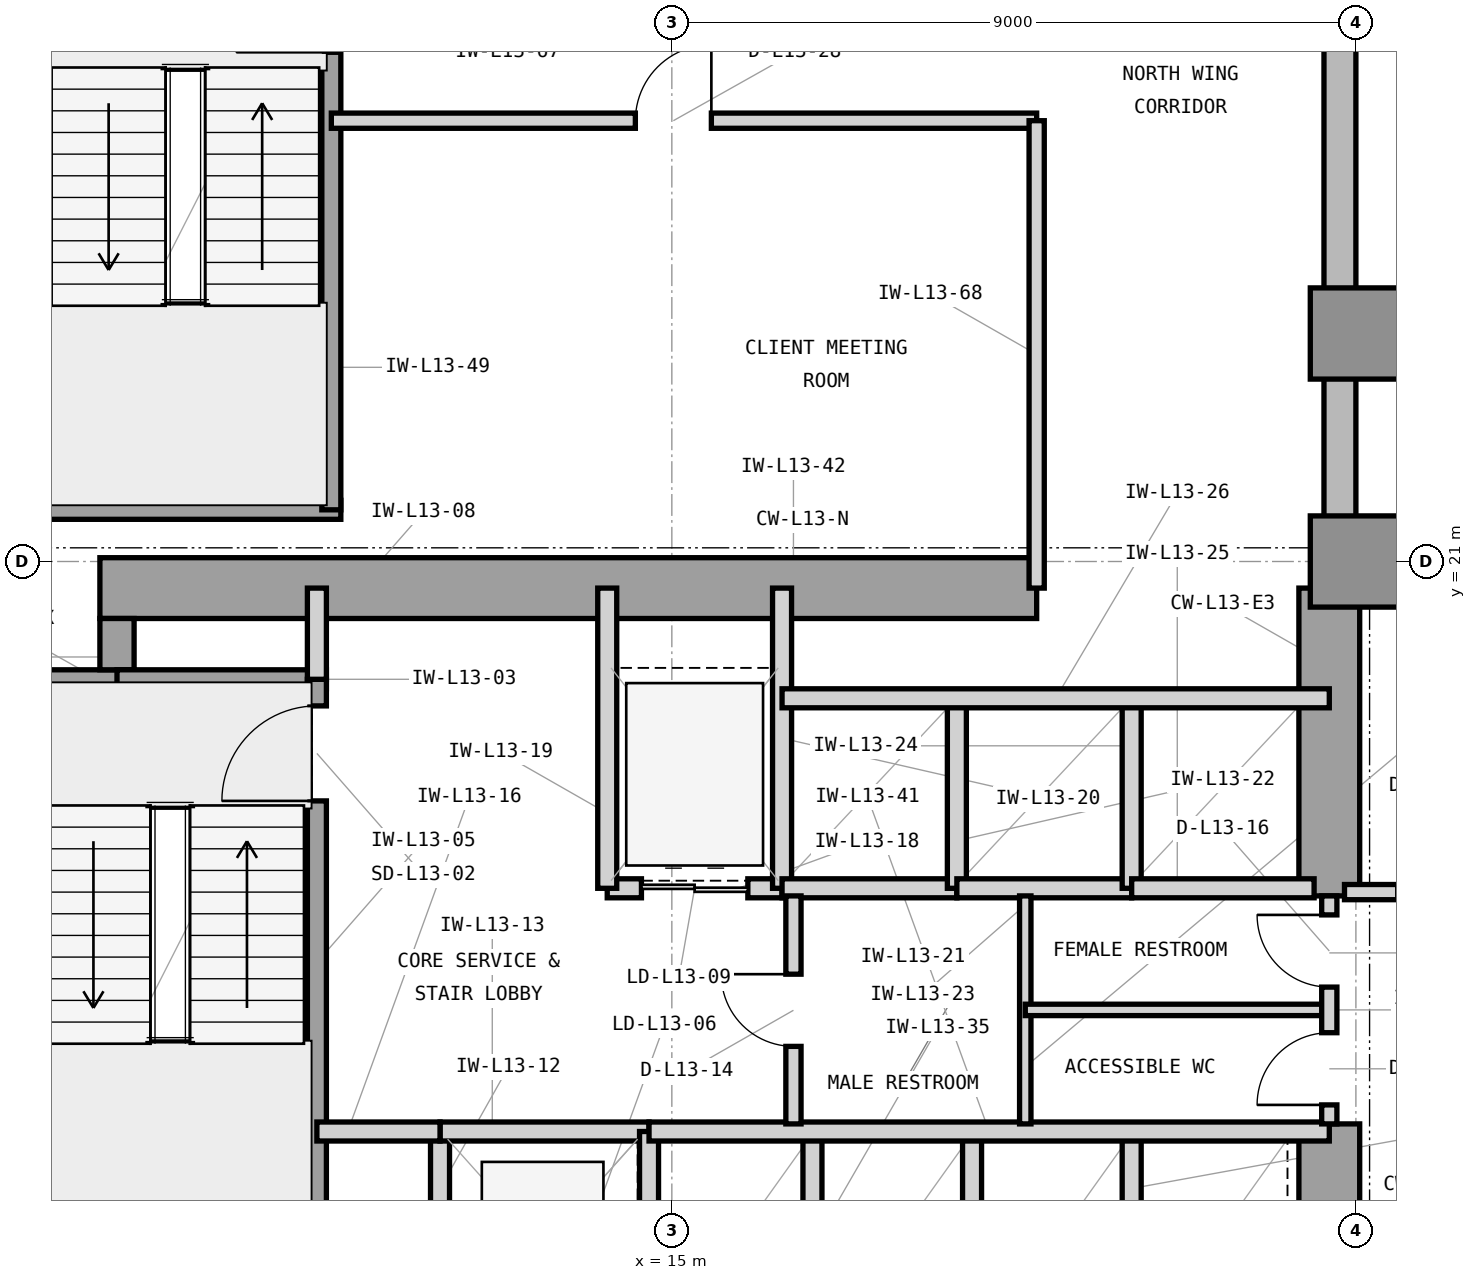
"""IFC4 building model, lengths in metres.
Left out: names, types, materials, properties, quantities, classifications, styles, units other than length and angle.
Written with IfcOpenShell. Run it as: python <this file> out.ifc"""

import sys

from ifc_helpers import new_model, si_unit, direction, frame, frame_2d, origin, origin_2d, place, context, subcontext, project, spatial, rectangle, extrude, element, fill, save


model = new_model("IFC4")
c1 = context("Model", 3, precision=1e-05, world=origin(), true_north=direction((0.0, 1.0)))
c2 = subcontext(c1, "Body", "Model", "MODEL_VIEW")
j1 = project(units=[si_unit("LENGTHUNIT", "METRE"), si_unit("PLANEANGLEUNIT", "RADIAN")], contexts=[c1])
p1 = place(None, origin())
s1 = spatial("IfcSite", under=j1, at=p1, CompositionType="ELEMENT")
p2 = place(p1, origin())
s2 = spatial("IfcBuilding", under=s1, at=p2, CompositionType="ELEMENT")
p3 = place(p2, frame((0.0, 0.0, 59.4)))
s3 = spatial("IfcBuildingStorey", under=s2, at=p3, CompositionType="ELEMENT", Elevation=59.4)
p4 = place(p3, frame((7.475, 20.65, 0.0), z_axis=(0.0, 0.0, 1.0), x_axis=(1.0, 0.0, 0.0)))
e1 = element("IfcWall", 1, at=p4, inside=s3, PredefinedType="SHEAR", context=c2, shape_type="SweptSolid", body=[
    extrude(rectangle(XDim=12.325, YDim=0.8, at=frame_2d((6.163, 0.0))), origin(), (0.0, 0.0, 1.0), 4.2),
])
p5 = place(p3, frame((23.65, 10.4, 0.0), z_axis=(0.0, 0.0, 1.0), x_axis=(0.0, 1.0, 0.0)))
e2 = element("IfcWall", 2, at=p5, inside=s3, PredefinedType="SHEAR", context=c2, shape_type="SweptSolid", body=[
    extrude(rectangle(XDim=3.2, YDim=0.8, at=frame_2d((1.6, 0.0))), origin(), (0.0, 0.0, 1.0), 4.2),
])
p6 = place(p3, frame((23.65, 16.6, 0.0), z_axis=(0.0, 0.0, 1.0), x_axis=(0.0, 1.0, 0.0)))
e3 = element("IfcWall", 3, at=p6, inside=s3, PredefinedType="SHEAR", context=c2, shape_type="SweptSolid", body=[
    extrude(rectangle(XDim=4.05, YDim=0.8, at=frame_2d((2.025, 0.0))), origin(), (0.0, 0.0, 1.0), 4.2),
])
p7 = place(p3, frame((6.75, 19.35, 0.0), z_axis=(0.0, 0.0, 1.0), x_axis=(1.0, 0.0, 0.0)))
e4 = element("IfcWall", 4, at=p7, inside=s3, PredefinedType="SHEAR", context=c2, shape_type="SweptSolid", body=[
    extrude(rectangle(XDim=1.175, YDim=0.45, at=frame_2d((0.587, 0.0))), origin(), (0.0, 0.0, 1.0), 4.2),
])
p8 = place(p3, frame((7.7, 19.575, 0.0), z_axis=(0.0, 0.0, 1.0), x_axis=(0.0, 1.0, 0.0)))
e5 = element("IfcWall", 5, at=p8, inside=s3, PredefinedType="SHEAR", context=c2, shape_type="SweptSolid", body=[
    extrude(rectangle(XDim=0.675, YDim=0.45, at=frame_2d((0.337, 0.0))), origin(), (0.0, 0.0, 1.0), 4.2),
])
for number, where, z_axis, x_axis in (
    (6, (24.0, 21.0, 0.0), (0.0, 0.0, 1.0), (1.0, 0.0, 0.0)),
    (7, (24.0, 24.0, 0.0), (0.0, 0.0, 1.0), (1.0, 0.0, 0.0)),
):
    element("IfcColumn", number, at=place(p3, frame(where, z_axis=z_axis, x_axis=x_axis)), inside=s3, PredefinedType="COLUMN", context=c2, shape_type="SweptSolid", body=[
        extrude(rectangle(XDim=1.2, YDim=1.2, at=origin_2d()), origin(), (0.0, 0.0, 1.0), 4.2),
    ])
p9 = place(p3, frame((64.4, 20.79, 0.0), z_axis=(0.0, 0.0, 1.0), x_axis=(-1.0, 0.0, 0.0)))
e8 = element("IfcWall", 8, at=p9, inside=s3, PredefinedType="STANDARD", context=c2, shape_type="SweptSolid", body=[
    extrude(rectangle(XDim=40.4, YDim=0.42, at=frame_2d((20.2, 0.0))), origin(), (0.0, 0.0, 1.0), 3.98),
])
p10 = place(p9, frame((26.375, 0.0, 0.85)))
e9 = element("IfcOpeningElement", 9, at=p10, cuts=e8, PredefinedType="OPENING", context=c2, shape_type="SweptSolid", body=[
    extrude(rectangle(XDim=2.8, YDim=2.45, at=frame_2d((1.4, 1.225))), frame((0.0, 0.22, 0.0), z_axis=(0.0, -1.0, 0.0), x_axis=(1.0, 0.0, 0.0)), (0.0, 0.0, 1.0), 0.44),
])
p11 = place(p9, frame((38.222, 0.0, 0.85)))
e10 = element("IfcOpeningElement", 10, at=p11, cuts=e8, PredefinedType="OPENING", context=c2, shape_type="SweptSolid", body=[
    extrude(rectangle(XDim=1.2, YDim=2.45, at=frame_2d((0.6, 1.225))), frame((0.0, 0.22, 0.0), z_axis=(0.0, -1.0, 0.0), x_axis=(1.0, 0.0, 0.0)), (0.0, 0.0, 1.0), 0.44),
])
p12 = place(p9, frame((33.286, 0.0, 0.85)))
e11 = element("IfcOpeningElement", 11, at=p12, cuts=e8, PredefinedType="OPENING", context=c2, shape_type="SweptSolid", body=[
    extrude(rectangle(XDim=2.8, YDim=2.45, at=frame_2d((1.4, 1.225))), frame((0.0, 0.22, 0.0), z_axis=(0.0, -1.0, 0.0), x_axis=(1.0, 0.0, 0.0)), (0.0, 0.0, 1.0), 0.44),
])
p13 = place(p9, frame((18.636, 0.0, 0.85)))
e12 = element("IfcOpeningElement", 12, at=p13, cuts=e8, PredefinedType="OPENING", context=c2, shape_type="SweptSolid", body=[
    extrude(rectangle(XDim=2.8, YDim=2.45, at=frame_2d((1.4, 1.225))), frame((0.0, 0.22, 0.0), z_axis=(0.0, -1.0, 0.0), x_axis=(1.0, 0.0, 0.0)), (0.0, 0.0, 1.0), 0.44),
])
p14 = place(p9, frame((11.436, 0.0, 0.85)))
e13 = element("IfcOpeningElement", 13, at=p14, cuts=e8, PredefinedType="OPENING", context=c2, shape_type="SweptSolid", body=[
    extrude(rectangle(XDim=1.2, YDim=2.45, at=frame_2d((0.6, 1.225))), frame((0.0, 0.22, 0.0), z_axis=(0.0, -1.0, 0.0), x_axis=(1.0, 0.0, 0.0)), (0.0, 0.0, 1.0), 0.44),
])
p15 = place(p3, frame((23.79, 21.0, 0.0), z_axis=(0.0, 0.0, 1.0), x_axis=(0.0, 1.0, 0.0)))
e14 = element("IfcWall", 14, at=p15, inside=s3, PredefinedType="STANDARD", context=c2, shape_type="SweptSolid", body=[
    extrude(rectangle(XDim=28.4, YDim=0.42, at=frame_2d((14.2, 0.0))), origin(), (0.0, 0.0, 1.0), 3.98),
])
p16 = place(p15, frame((10.433, 0.0, 0.85)))
e15 = element("IfcOpeningElement", 15, at=p16, cuts=e14, PredefinedType="OPENING", context=c2, shape_type="SweptSolid", body=[
    extrude(rectangle(XDim=2.8, YDim=2.45, at=frame_2d((1.4, 1.225))), frame((0.0, 0.22, 0.0), z_axis=(0.0, -1.0, 0.0), x_axis=(1.0, 0.0, 0.0)), (0.0, 0.0, 1.0), 0.44),
])
p17 = place(p3, frame((7.7, 19.45, 0.0), z_axis=(0.0, 0.0, 1.0), x_axis=(1.0, 0.0, 0.0)))
e16 = element("IfcWall", 16, at=p17, inside=s3, PredefinedType="SHEAR", context=c2, shape_type="SweptSolid", body=[
    extrude(rectangle(XDim=2.755, YDim=0.25, at=frame_2d((1.377, 0.0))), origin(), (0.0, 0.0, 1.0), 4.2),
])
p18 = place(p3, frame((10.33, 12.0, 0.0), z_axis=(0.0, 0.0, 1.0), x_axis=(0.0, 1.0, 0.0)))
e17 = element("IfcWall", 17, at=p18, inside=s3, PredefinedType="SHEAR", context=c2, shape_type="SweptSolid", body=[
    extrude(rectangle(XDim=7.45, YDim=0.25, at=frame_2d((3.725, 0.0))), origin(), (0.0, 0.0, 1.0), 4.2),
])
p19 = place(p18, frame((5.85, 0.0, 0.0)))
e18 = element("IfcOpeningElement", 18, at=p19, cuts=e17, PredefinedType="OPENING", context=c2, shape_type="SweptSolid", body=[
    extrude(rectangle(XDim=1.25, YDim=2.2, at=frame_2d((0.625, 1.1))), frame((0.0, 0.135, 0.0), z_axis=(0.0, -1.0, 0.0), x_axis=(1.0, 0.0, 0.0)), (0.0, 0.0, 1.0), 0.27),
])
p20 = place(p3, frame((10.33, 19.45, 0.0), z_axis=(0.0, 0.0, 1.0), x_axis=(0.0, 1.0, 0.0)))
e19 = element("IfcWall", 19, at=p20, inside=s3, PredefinedType="PARTITIONING", context=c2, shape_type="SweptSolid", body=[
    extrude(rectangle(XDim=1.2, YDim=0.25, at=frame_2d((0.6, 0.0))), origin(), (0.0, 0.0, 1.0), 3.114),
])
p21 = place(p3, frame((11.95, 10.5, 0.0), z_axis=(0.0, 0.0, 1.0), x_axis=(0.0, 1.0, 0.0)))
e20 = element("IfcWall", 20, at=p21, inside=s3, PredefinedType="PARTITIONING", context=c2, shape_type="SweptSolid", body=[
    extrude(rectangle(XDim=3.0, YDim=0.25, at=frame_2d((1.5, 0.0))), origin(), (0.0, 0.0, 1.0), 3.97),
])
p22 = place(p3, frame((11.95, 13.5, 0.0), z_axis=(0.0, 0.0, 1.0), x_axis=(1.0, 0.0, 0.0)))
e21 = element("IfcWall", 21, at=p22, inside=s3, PredefinedType="PARTITIONING", context=c2, shape_type="SweptSolid", body=[
    extrude(rectangle(XDim=2.75, YDim=0.25, at=frame_2d((1.375, 0.0))), origin(), (0.0, 0.0, 1.0), 3.426),
])
p23 = place(p3, frame((14.7, 10.5, 0.0), z_axis=(0.0, 0.0, 1.0), x_axis=(0.0, 1.0, 0.0)))
e22 = element("IfcWall", 22, at=p23, inside=s3, PredefinedType="PARTITIONING", context=c2, shape_type="SweptSolid", body=[
    extrude(rectangle(XDim=3.0, YDim=0.25, at=frame_2d((1.5, 0.0))), origin(), (0.0, 0.0, 1.0), 3.97),
])
p24 = place(p3, frame((10.33, 13.5, 0.0), z_axis=(0.0, 0.0, 1.0), x_axis=(1.0, 0.0, 0.0)))
e23 = element("IfcWall", 23, at=p24, inside=s3, PredefinedType="PARTITIONING", context=c2, shape_type="SweptSolid", body=[
    extrude(rectangle(XDim=1.62, YDim=0.25, at=frame_2d((0.81, 0.0))), origin(), (0.0, 0.0, 1.0), 3.426),
])
p25 = place(p3, frame((14.15, 16.7, 0.0), z_axis=(0.0, 0.0, 1.0), x_axis=(1.0, 0.0, 0.0)))
e24 = element("IfcWall", 24, at=p25, inside=s3, PredefinedType="PARTITIONING", context=c2, shape_type="SweptSolid", body=[
    extrude(rectangle(XDim=2.3, YDim=0.25, at=frame_2d((1.15, 0.0))), origin(), (0.0, 0.0, 1.0), 3.426),
])
p26 = place(p25, frame((0.45, 0.0, 0.0)))
e25 = element("IfcOpeningElement", 25, at=p26, cuts=e24, PredefinedType="OPENING", context=c2, shape_type="SweptSolid", body=[
    extrude(rectangle(XDim=1.4, YDim=2.35, at=frame_2d((0.7, 1.175))), frame((0.0, 0.135, 0.0), z_axis=(0.0, -1.0, 0.0), x_axis=(1.0, 0.0, 0.0)), (0.0, 0.0, 1.0), 0.27),
])
for number, where, z_axis, x_axis in (
    (26, (14.15, 16.7, 0.0), (0.0, 0.0, 1.0), (0.0, 1.0, 0.0)),
    (27, (16.45, 16.7, 0.0), (0.0, 0.0, 1.0), (0.0, 1.0, 0.0)),
):
    element("IfcWall", number, at=place(p3, frame(where, z_axis=z_axis, x_axis=x_axis)), inside=s3, PredefinedType="PARTITIONING", context=c2, shape_type="SweptSolid", body=[
        extrude(rectangle(XDim=3.95, YDim=0.25, at=frame_2d((1.975, 0.0))), origin(), (0.0, 0.0, 1.0), 3.97),
    ])
p27 = place(p3, frame((16.45, 16.7, 0.0), z_axis=(0.0, 0.0, 1.0), x_axis=(1.0, 0.0, 0.0)))
e28 = element("IfcWall", 28, at=p27, inside=s3, PredefinedType="PARTITIONING", context=c2, shape_type="SweptSolid", body=[
    extrude(rectangle(XDim=2.3, YDim=0.25, at=frame_2d((1.15, 0.0))), origin(), (0.0, 0.0, 1.0), 3.426),
])
p28 = place(p3, frame((18.75, 16.7, 0.0), z_axis=(0.0, 0.0, 1.0), x_axis=(0.0, 1.0, 0.0)))
e29 = element("IfcWall", 29, at=p28, inside=s3, PredefinedType="PARTITIONING", context=c2, shape_type="SweptSolid", body=[
    extrude(rectangle(XDim=2.5, YDim=0.25, at=frame_2d((1.25, 0.0))), origin(), (0.0, 0.0, 1.0), 3.97),
])
p29 = place(p3, frame((18.75, 16.7, 0.0), z_axis=(0.0, 0.0, 1.0), x_axis=(1.0, 0.0, 0.0)))
e30 = element("IfcWall", 30, at=p29, inside=s3, PredefinedType="PARTITIONING", context=c2, shape_type="SweptSolid", body=[
    extrude(rectangle(XDim=2.3, YDim=0.25, at=frame_2d((1.15, 0.0))), origin(), (0.0, 0.0, 1.0), 3.426),
])
p30 = place(p3, frame((21.05, 16.7, 0.0), z_axis=(0.0, 0.0, 1.0), x_axis=(0.0, 1.0, 0.0)))
e31 = element("IfcWall", 31, at=p30, inside=s3, PredefinedType="PARTITIONING", context=c2, shape_type="SweptSolid", body=[
    extrude(rectangle(XDim=2.5, YDim=0.25, at=frame_2d((1.25, 0.0))), origin(), (0.0, 0.0, 1.0), 3.97),
])
p31 = place(p3, frame((21.05, 16.7, 0.0), z_axis=(0.0, 0.0, 1.0), x_axis=(1.0, 0.0, 0.0)))
e32 = element("IfcWall", 32, at=p31, inside=s3, PredefinedType="PARTITIONING", context=c2, shape_type="SweptSolid", body=[
    extrude(rectangle(XDim=2.4, YDim=0.25, at=frame_2d((1.2, 0.0))), origin(), (0.0, 0.0, 1.0), 3.426),
])
p32 = place(p3, frame((16.45, 19.2, 0.0), z_axis=(0.0, 0.0, 1.0), x_axis=(1.0, 0.0, 0.0)))
e33 = element("IfcWall", 33, at=p32, inside=s3, PredefinedType="PARTITIONING", context=c2, shape_type="SweptSolid", body=[
    extrude(rectangle(XDim=7.2, YDim=0.25, at=frame_2d((3.6, 0.0))), origin(), (0.0, 0.0, 1.0), 3.97),
])
for number, where, z_axis, x_axis in (
    (34, (16.85, 10.5, 0.0), (0.0, 0.0, 1.0), (0.0, 1.0, 0.0)),
    (35, (18.95, 10.5, 0.0), (0.0, 0.0, 1.0), (0.0, 1.0, 0.0)),
    (36, (21.05, 10.5, 0.0), (0.0, 0.0, 1.0), (0.0, 1.0, 0.0)),
):
    element("IfcWall", number, at=place(p3, frame(where, z_axis=z_axis, x_axis=x_axis)), inside=s3, PredefinedType="PARTITIONING", context=c2, shape_type="SweptSolid", body=[
        extrude(rectangle(XDim=3.0, YDim=0.25, at=frame_2d((1.5, 0.0))), origin(), (0.0, 0.0, 1.0), 3.97),
    ])
p33 = place(p3, frame((14.7, 13.5, 0.0), z_axis=(0.0, 0.0, 1.0), x_axis=(1.0, 0.0, 0.0)))
e37 = element("IfcWall", 37, at=p33, inside=s3, PredefinedType="PARTITIONING", context=c2, shape_type="SweptSolid", body=[
    extrude(rectangle(XDim=8.95, YDim=0.25, at=frame_2d((4.475, 0.0))), origin(), (0.0, 0.0, 1.0), 3.426),
])
p34 = place(p3, frame((16.6, 13.6, 0.0), z_axis=(0.0, 0.0, 1.0), x_axis=(0.0, 1.0, 0.0)))
e38 = element("IfcWall", 38, at=p34, inside=s3, PredefinedType="PARTITIONING", context=c2, shape_type="SweptSolid", body=[
    extrude(rectangle(XDim=3.0, YDim=0.2, at=frame_2d((1.5, 0.0))), origin(), (0.0, 0.0, 1.0), 3.97),
])
p35 = place(p34, frame((1.02, 0.0, 0.0)))
e39 = element("IfcOpeningElement", 39, at=p35, cuts=e38, PredefinedType="OPENING", context=c2, shape_type="SweptSolid", body=[
    extrude(rectangle(XDim=0.95, YDim=2.1, at=frame_2d((0.475, 1.05))), frame((0.0, 0.11, 0.0), z_axis=(0.0, -1.0, 0.0), x_axis=(1.0, 0.0, 0.0)), (0.0, 0.0, 1.0), 0.22),
])
p36 = place(p3, frame((19.65, 13.6, 0.0), z_axis=(0.0, 0.0, 1.0), x_axis=(0.0, 1.0, 0.0)))
e40 = element("IfcWall", 40, at=p36, inside=s3, PredefinedType="PARTITIONING", context=c2, shape_type="SweptSolid", body=[
    extrude(rectangle(XDim=3.0, YDim=0.15, at=frame_2d((1.5, 0.0))), origin(), (0.0, 0.0, 1.0), 3.97),
])
p37 = place(p3, frame((19.65, 15.1, 0.0), z_axis=(0.0, 0.0, 1.0), x_axis=(1.0, 0.0, 0.0)))
e41 = element("IfcWall", 41, at=p37, inside=s3, PredefinedType="PARTITIONING", context=c2, shape_type="SweptSolid", body=[
    extrude(rectangle(XDim=4.0, YDim=0.15, at=frame_2d((2.0, 0.0))), origin(), (0.0, 0.0, 1.0), 3.97),
])
p38 = place(p3, frame((23.65, 13.6, 0.0), z_axis=(0.0, 0.0, 1.0), x_axis=(0.0, 1.0, 0.0)))
e42 = element("IfcWall", 42, at=p38, inside=s3, PredefinedType="PARTITIONING", context=c2, shape_type="SweptSolid", body=[
    extrude(rectangle(XDim=3.0, YDim=0.2, at=frame_2d((1.5, 0.0))), origin(), (0.0, 0.0, 1.0), 3.97),
])
p39 = place(p38, frame((0.25, 0.0, 0.0)))
e43 = element("IfcOpeningElement", 43, at=p39, cuts=e42, PredefinedType="OPENING", context=c2, shape_type="SweptSolid", body=[
    extrude(rectangle(XDim=0.95, YDim=2.1, at=frame_2d((0.475, 1.05))), frame((0.0, 0.11, 0.0), z_axis=(0.0, -1.0, 0.0), x_axis=(1.0, 0.0, 0.0)), (0.0, 0.0, 1.0), 0.22),
])
p40 = place(p38, frame((1.8, 0.0, 0.0)))
e44 = element("IfcOpeningElement", 44, at=p40, cuts=e42, PredefinedType="OPENING", context=c2, shape_type="SweptSolid", body=[
    extrude(rectangle(XDim=0.95, YDim=2.1, at=frame_2d((0.475, 1.05))), frame((0.0, 0.11, 0.0), z_axis=(0.0, -1.0, 0.0), x_axis=(1.0, 0.0, 0.0)), (0.0, 0.0, 1.0), 0.22),
])
p41 = place(p3, frame((6.555, 21.68, 0.0), z_axis=(0.0, 0.0, 1.0), x_axis=(1.0, 0.0, 0.0)))
e45 = element("IfcWall", 45, at=p41, inside=s3, PredefinedType="SHEAR", context=c2, shape_type="SweptSolid", body=[
    extrude(rectangle(XDim=4.09, YDim=0.25, at=frame_2d((2.045, 0.0))), origin(), (0.0, 0.0, 1.0), 4.2),
])
p42 = place(p3, frame((10.52, 21.68, 0.0), z_axis=(0.0, 0.0, 1.0), x_axis=(0.0, 1.0, 0.0)))
e46 = element("IfcWall", 46, at=p42, inside=s3, PredefinedType="SHEAR", context=c2, shape_type="SweptSolid", body=[
    extrude(rectangle(XDim=7.5, YDim=0.25, at=frame_2d((3.75, 0.0))), origin(), (0.0, 0.0, 1.0), 4.2),
])
p43 = place(p42, frame((6.02, 0.0, 0.0)))
e47 = element("IfcOpeningElement", 47, at=p43, cuts=e46, PredefinedType="OPENING", context=c2, shape_type="SweptSolid", body=[
    extrude(rectangle(XDim=1.25, YDim=2.2, at=frame_2d((0.625, 1.1))), frame((0.0, 0.135, 0.0), z_axis=(0.0, -1.0, 0.0), x_axis=(1.0, 0.0, 0.0)), (0.0, 0.0, 1.0), 0.27),
])
p44 = place(p3, frame((23.85, 16.65, 0.0), z_axis=(0.0, 0.0, 1.0), x_axis=(1.0, 0.0, 0.0)))
e48 = element("IfcWall", 48, at=p44, inside=s3, PredefinedType="PARTITIONING", context=c2, shape_type="SweptSolid", body=[
    extrude(rectangle(XDim=2.85, YDim=0.2, at=frame_2d((1.425, 0.0))), origin(), (0.0, 0.0, 1.0), 3.97),
])
p45 = place(p44, frame((0.7, 0.0, 0.0)))
e49 = element("IfcOpeningElement", 49, at=p45, cuts=e48, PredefinedType="OPENING", context=c2, shape_type="SweptSolid", body=[
    extrude(rectangle(XDim=1.0, YDim=2.15, at=frame_2d((0.5, 1.075))), frame((0.0, 0.11, 0.0), z_axis=(0.0, -1.0, 0.0), x_axis=(1.0, 0.0, 0.0)), (0.0, 0.0, 1.0), 0.22),
])
p46 = place(p3, frame((10.52, 26.8, 0.0), z_axis=(0.0, 0.0, 1.0), x_axis=(1.0, 0.0, 0.0)))
e50 = element("IfcWall", 50, at=p46, inside=s3, PredefinedType="PARTITIONING", context=c2, shape_type="SweptSolid", body=[
    extrude(rectangle(XDim=9.28, YDim=0.2, at=frame_2d((4.64, 0.0))), origin(), (0.0, 0.0, 1.0), 3.97),
])
p47 = place(p46, frame((4.0, 0.0, 0.0)))
e51 = element("IfcOpeningElement", 51, at=p47, cuts=e50, PredefinedType="OPENING", context=c2, shape_type="SweptSolid", body=[
    extrude(rectangle(XDim=1.0, YDim=2.15, at=frame_2d((0.5, 1.075))), frame((0.0, 0.11, 0.0), z_axis=(0.0, -1.0, 0.0), x_axis=(1.0, 0.0, 0.0)), (0.0, 0.0, 1.0), 0.22),
])
p48 = place(p3, frame((19.8, 20.65, 0.0), z_axis=(0.0, 0.0, 1.0), x_axis=(0.0, 1.0, 0.0)))
e52 = element("IfcWall", 52, at=p48, inside=s3, PredefinedType="PARTITIONING", context=c2, shape_type="SweptSolid", body=[
    extrude(rectangle(XDim=6.15, YDim=0.2, at=frame_2d((3.075, 0.0))), origin(), (0.0, 0.0, 1.0), 3.97),
])
p49 = place(p19, origin())
e53 = element("IfcDoor", 53, at=p49, inside=s3, OperationType="SINGLE_SWING_LEFT", PredefinedType="DOOR", context=c2, shape_type="SweptSolid", body=[
    extrude(rectangle(XDim=1.25, YDim=2.2, at=frame_2d((0.625, 1.1))), frame((0.0, 0.025, 0.0), z_axis=(0.0, -1.0, 0.0), x_axis=(1.0, 0.0, 0.0)), (0.0, 0.0, 1.0), 0.05),
])
fill(e18, e53)
p50 = place(p26, origin())
e54 = element("IfcDoor", 54, at=p50, inside=s3, OperationType="DOUBLE_DOOR_SLIDING", PredefinedType="DOOR", context=c2, shape_type="SweptSolid", body=[
    extrude(rectangle(XDim=1.4, YDim=2.35, at=frame_2d((0.7, 1.175))), frame((0.0, 0.025, 0.0), z_axis=(0.0, -1.0, 0.0), x_axis=(1.0, 0.0, 0.0)), (0.0, 0.0, 1.0), 0.05),
])
fill(e25, e54)
p51 = place(p35, origin())
e55 = element("IfcDoor", 55, at=p51, inside=s3, OperationType="SINGLE_SWING_RIGHT", PredefinedType="DOOR", context=c2, shape_type="SweptSolid", body=[
    extrude(rectangle(XDim=0.95, YDim=2.1, at=frame_2d((0.475, 1.05))), frame((0.0, 0.025, 0.0), z_axis=(0.0, -1.0, 0.0), x_axis=(1.0, 0.0, 0.0)), (0.0, 0.0, 1.0), 0.05),
])
fill(e39, e55)
p52 = place(p39, origin())
e56 = element("IfcDoor", 56, at=p52, inside=s3, OperationType="SINGLE_SWING_LEFT", PredefinedType="DOOR", context=c2, shape_type="SweptSolid", body=[
    extrude(rectangle(XDim=0.95, YDim=2.1, at=frame_2d((0.475, 1.05))), frame((0.0, 0.025, 0.0), z_axis=(0.0, -1.0, 0.0), x_axis=(1.0, 0.0, 0.0)), (0.0, 0.0, 1.0), 0.05),
])
fill(e43, e56)
p53 = place(p40, origin())
e57 = element("IfcDoor", 57, at=p53, inside=s3, OperationType="SINGLE_SWING_RIGHT", PredefinedType="DOOR", context=c2, shape_type="SweptSolid", body=[
    extrude(rectangle(XDim=0.95, YDim=2.1, at=frame_2d((0.475, 1.05))), frame((0.0, 0.025, 0.0), z_axis=(0.0, -1.0, 0.0), x_axis=(1.0, 0.0, 0.0)), (0.0, 0.0, 1.0), 0.05),
])
fill(e44, e57)
p54 = place(p47, origin())
e58 = element("IfcDoor", 58, at=p54, inside=s3, OperationType="SINGLE_SWING_RIGHT", PredefinedType="DOOR", context=c2, shape_type="SweptSolid", body=[
    extrude(rectangle(XDim=1.0, YDim=2.15, at=frame_2d((0.5, 1.075))), frame((0.0, 0.025, 0.0), z_axis=(0.0, -1.0, 0.0), x_axis=(1.0, 0.0, 0.0)), (0.0, 0.0, 1.0), 0.05),
])
fill(e51, e58)
save(model, sys.argv[1])
